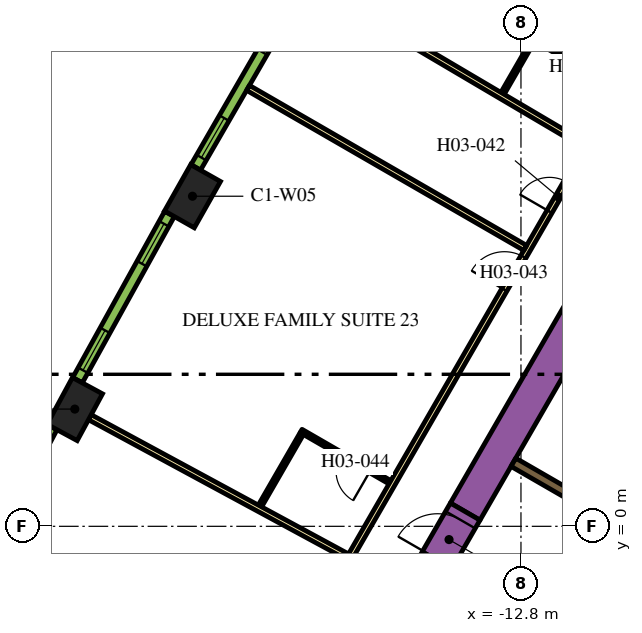
"""IFC4 building model, lengths in metres.
Left out: names, types, materials, properties, quantities, classifications, styles, units other than length and angle.
Written with IfcOpenShell. Run it as: python <this file> out.ifc"""

import sys

from ifc_helpers import new_model, si_unit, direction, frame, frame_2d, origin, origin_2d, place, context, subcontext, project, spatial, rectangle, extrude, element, fill, save


model = new_model("IFC4")
c1 = context("Model", 3, precision=1e-05, world=origin(), true_north=direction((0.0, 1.0)))
c2 = subcontext(c1, "Body", "Model", "MODEL_VIEW")
j1 = project(units=[si_unit("LENGTHUNIT", "METRE"), si_unit("PLANEANGLEUNIT", "RADIAN")], contexts=[c1])
p1 = place(None, origin())
s1 = spatial("IfcSite", under=j1, at=p1, CompositionType="ELEMENT")
p2 = place(p1, origin())
s2 = spatial("IfcBuilding", under=s1, at=p2, CompositionType="ELEMENT")
p3 = place(p2, frame((0.0, 0.0, 54.9)))
s3 = spatial("IfcBuildingStorey", under=s2, at=p3, CompositionType="ELEMENT", Elevation=54.9)
for number, where, z_axis, x_axis in (
    (1, (-21.443, 8.685, 0.0), (0.0, 0.0, 1.0), (-0.492, -0.871, 0.0)),
    (2, (-24.54, 3.085, 0.0), (0.0, 0.0, 1.0), (-0.476, -0.88, 0.0)),
):
    element("IfcColumn", number, at=place(p3, frame(where, z_axis=z_axis, x_axis=x_axis)), inside=s3, PredefinedType="COLUMN", context=c2, shape_type="SweptSolid", body=[
        extrude(rectangle(XDim=1.4, YDim=0.9, at=origin_2d()), origin(), (0.0, 0.0, 1.0), 3.9),
    ])
p4 = place(p3, frame((-14.268, 0.387, 0.0), z_axis=(0.0, 0.0, 1.0), x_axis=(0.499994617707, 0.866028511231, 0.0)))
e3 = element("IfcWall", 3, at=p4, inside=s3, PredefinedType="SOLIDWALL", context=c2, shape_type="SweptSolid", body=[
    extrude(rectangle(XDim=18.817, YDim=0.9, at=frame_2d((9.409, 0.0))), origin(), (0.0, 0.0, 1.0), 3.9),
])
p5 = place(p3, frame((-12.999, 1.685, 0.0), z_axis=(0.0, 0.0, 1.0), x_axis=(0.865996765544, -0.500049599607, 0.0)))
e4 = element("IfcWall", 4, at=p5, inside=s3, PredefinedType="SOLIDWALL", context=c2, shape_type="SweptSolid", body=[
    extrude(rectangle(XDim=2.498, YDim=0.25, at=frame_2d((1.249, 0.0))), origin(), (0.0, 0.0, 1.0), 3.9),
])
p6 = place(p3, frame((-15.118, -1.085, 0.0), z_axis=(0.0, 0.0, 1.0), x_axis=(0.500000056704, 0.866025371046, 0.0)))
e5 = element("IfcWall", 5, at=p6, inside=s3, PredefinedType="SOLIDWALL", context=c2, shape_type="SweptSolid", body=[
    extrude(rectangle(XDim=1.7, YDim=0.9, at=frame_2d((0.85, 0.0))), origin(), (0.0, 0.0, 1.0), 3.9),
])
p7 = place(p6, frame((0.25, 0.0, 0.0)))
e6 = element("IfcOpeningElement", 6, at=p7, cuts=e5, PredefinedType="OPENING", context=c2, shape_type="SweptSolid", body=[
    extrude(rectangle(XDim=1.2, YDim=2.1, at=frame_2d((0.6, 1.05))), frame((0.0, 0.46, 0.0), z_axis=(0.0, -1.0, 0.0), x_axis=(1.0, 0.0, 0.0)), (0.0, 0.0, 1.0), 0.92),
])
p8 = place(p3, frame((-19.081, -3.9, 0.0), z_axis=(0.0, 0.0, 1.0), x_axis=(0.499998313975, 0.866026377209, 0.0)))
e7 = element("IfcWall", 7, at=p8, inside=s3, PredefinedType="PARTITIONING", context=c2, shape_type="SweptSolid", body=[
    extrude(rectangle(XDim=25.766, YDim=0.15, at=frame_2d((12.883, 0.0))), origin(), (0.0, 0.0, 1.0), 2.75),
])
p9 = place(p8, frame((22.445, 0.0, 0.0)))
e8 = element("IfcOpeningElement", 8, at=p9, cuts=e7, PredefinedType="OPENING", context=c2, shape_type="SweptSolid", body=[
    extrude(rectangle(XDim=1.0, YDim=2.1, at=frame_2d((0.5, 1.05))), frame((0.0, 0.085, 0.0), z_axis=(0.0, -1.0, 0.0), x_axis=(1.0, 0.0, 0.0)), (0.0, 0.0, 1.0), 0.17),
])
p10 = place(p8, frame((21.138, 0.0, 0.0)))
e9 = element("IfcOpeningElement", 9, at=p10, cuts=e7, PredefinedType="OPENING", context=c2, shape_type="SweptSolid", body=[
    extrude(rectangle(XDim=1.0, YDim=2.1, at=frame_2d((0.5, 1.05))), frame((0.0, 0.085, 0.0), z_axis=(0.0, -1.0, 0.0), x_axis=(1.0, 0.0, 0.0)), (0.0, 0.0, 1.0), 0.17),
])
p11 = place(p8, frame((14.066, 0.0, 0.0)))
e10 = element("IfcOpeningElement", 10, at=p11, cuts=e7, PredefinedType="OPENING", context=c2, shape_type="SweptSolid", body=[
    extrude(rectangle(XDim=0.9, YDim=2.1, at=frame_2d((0.45, 1.05))), frame((0.0, 0.085, 0.0), z_axis=(0.0, -1.0, 0.0), x_axis=(1.0, 0.0, 0.0)), (0.0, 0.0, 1.0), 0.17),
])
p12 = place(p8, frame((11.693, 0.0, 0.0)))
e11 = element("IfcOpeningElement", 11, at=p12, cuts=e7, PredefinedType="OPENING", context=c2, shape_type="SweptSolid", body=[
    extrude(rectangle(XDim=1.0, YDim=2.1, at=frame_2d((0.5, 1.05))), frame((0.0, 0.085, 0.0), z_axis=(0.0, -1.0, 0.0), x_axis=(1.0, 0.0, 0.0)), (0.0, 0.0, 1.0), 0.17),
])
p13 = place(p3, frame((-24.145, 2.871, 0.0), z_axis=(0.0, 0.0, 1.0), x_axis=(0.879551725039, -0.475803281809, 0.0)))
e12 = element("IfcWall", 12, at=p13, inside=s3, PredefinedType="PARTITIONING", context=c2, shape_type="SweptSolid", body=[
    extrude(rectangle(XDim=7.688, YDim=0.15, at=frame_2d((3.844, 0.0))), origin(), (0.0, 0.0, 1.0), 2.75),
])
p14 = place(p3, frame((-19.982, 11.537, 0.0), z_axis=(0.0, 0.0, 1.0), x_axis=(0.866020994654, -0.500007636761, 0.0)))
e13 = element("IfcWall", 13, at=p14, inside=s3, PredefinedType="PARTITIONING", context=c2, shape_type="SweptSolid", body=[
    extrude(rectangle(XDim=8.423, YDim=0.15, at=frame_2d((4.211, 0.0))), origin(), (0.0, 0.0, 1.0), 2.75),
])
p15 = place(p3, frame((-17.856, 13.999, 0.0), z_axis=(0.0, 0.0, 1.0), x_axis=(0.861371519381, -0.507975497047, 0.0)))
e14 = element("IfcWall", 14, at=p15, inside=s3, PredefinedType="PARTITIONING", context=c2, shape_type="SweptSolid", body=[
    extrude(rectangle(XDim=7.804, YDim=0.15, at=frame_2d((3.902, 0.0))), origin(), (0.0, 0.0, 1.0), 2.75),
])
p16 = place(p3, frame((-10.249, 11.549, 0.0), z_axis=(0.0, 0.0, 1.0), x_axis=(-0.866021400173, 0.500006934395, 0.0)))
e15 = element("IfcWall", 15, at=p16, inside=s3, PredefinedType="PARTITIONING", context=c2, shape_type="SweptSolid", body=[
    extrude(rectangle(XDim=2.6, YDim=0.1, at=frame_2d((1.3, 0.0))), origin(), (0.0, 0.0, 1.0), 2.75),
])
p17 = place(p16, frame((0.6, 0.0, 0.0)))
e16 = element("IfcOpeningElement", 16, at=p17, cuts=e15, PredefinedType="OPENING", context=c2, shape_type="SweptSolid", body=[
    extrude(rectangle(XDim=0.9, YDim=2.1, at=frame_2d((0.45, 1.05))), frame((0.0, 0.06, 0.0), z_axis=(0.0, -1.0, 0.0), x_axis=(1.0, 0.0, 0.0)), (0.0, 0.0, 1.0), 0.12),
])
p18 = place(p3, frame((-12.487, 12.772, 0.0), z_axis=(0.0, 0.0, 1.0), x_axis=(-0.500085729368, -0.865975902253, 0.0)))
e17 = element("IfcWall", 17, at=p18, inside=s3, PredefinedType="PARTITIONING", context=c2, shape_type="SweptSolid", body=[
    extrude(rectangle(XDim=1.59, YDim=0.1, at=frame_2d((0.795, 0.0))), origin(), (0.0, 0.0, 1.0), 2.75),
])
p19 = place(p3, frame((-16.247, 1.159, 0.0), z_axis=(0.0, 0.0, 1.0), x_axis=(-0.866059108428, 0.4999416173, 0.0)))
e18 = element("IfcWall", 18, at=p19, inside=s3, PredefinedType="PARTITIONING", context=c2, shape_type="SweptSolid", body=[
    extrude(rectangle(XDim=2.7, YDim=0.1, at=frame_2d((1.35, 0.0))), origin(), (0.0, 0.0, 1.0), 2.75),
])
p20 = place(p19, frame((0.6, 0.0, 0.0)))
e19 = element("IfcOpeningElement", 19, at=p20, cuts=e18, PredefinedType="OPENING", context=c2, shape_type="SweptSolid", body=[
    extrude(rectangle(XDim=0.9, YDim=2.1, at=frame_2d((0.45, 1.05))), frame((0.0, 0.06, 0.0), z_axis=(0.0, -1.0, 0.0), x_axis=(1.0, 0.0, 0.0)), (0.0, 0.0, 1.0), 0.12),
])
p21 = place(p3, frame((-18.567, 2.441, 0.0), z_axis=(0.0, 0.0, 1.0), x_axis=(-0.499946605688, -0.86605622881, 0.0)))
e20 = element("IfcWall", 20, at=p21, inside=s3, PredefinedType="PARTITIONING", context=c2, shape_type="SweptSolid", body=[
    extrude(rectangle(XDim=2.2, YDim=0.1, at=frame_2d((1.1, 0.0))), origin(), (0.0, 0.0, 1.0), 2.75),
])
p22 = place(p3, frame((-18.858, 13.773, 0.0), z_axis=(0.0, 0.0, 1.0), x_axis=(-0.50002123722, -0.866013142123, 0.0)))
e21 = element("IfcWall", 21, at=p22, inside=s3, PredefinedType="SOLIDWALL", context=c2, shape_type="SweptSolid", body=[
    extrude(rectangle(XDim=4.998, YDim=0.29, at=frame_2d((2.499, 0.0))), origin(), (0.0, 0.0, 1.0), 3.65),
])
p23 = place(p22, frame((0.297, 0.0, 0.9)))
e22 = element("IfcOpeningElement", 22, at=p23, cuts=e21, PredefinedType="OPENING", context=c2, shape_type="SweptSolid", body=[
    extrude(rectangle(XDim=1.2, YDim=2.15, at=frame_2d((0.6, 1.075))), frame((0.0, 0.155, 0.0), z_axis=(0.0, -1.0, 0.0), x_axis=(1.0, 0.0, 0.0)), (0.0, 0.0, 1.0), 0.31),
])
p24 = place(p22, frame((3.501, 0.0, 0.9)))
e23 = element("IfcOpeningElement", 23, at=p24, cuts=e21, PredefinedType="OPENING", context=c2, shape_type="SweptSolid", body=[
    extrude(rectangle(XDim=1.2, YDim=2.15, at=frame_2d((0.6, 1.075))), frame((0.0, 0.155, 0.0), z_axis=(0.0, -1.0, 0.0), x_axis=(1.0, 0.0, 0.0)), (0.0, 0.0, 1.0), 0.31),
])
p25 = place(p3, frame((-22.05, 8.22, 0.0), z_axis=(0.0, 0.0, 1.0), x_axis=(-0.483912572871, -0.875116347589, 0.0)))
e24 = element("IfcWall", 24, at=p25, inside=s3, PredefinedType="SOLIDWALL", context=c2, shape_type="SweptSolid", body=[
    extrude(rectangle(XDim=4.998, YDim=0.29, at=frame_2d((2.499, 0.0))), origin(), (0.0, 0.0, 1.0), 3.65),
])
p26 = place(p25, frame((0.297, 0.0, 0.9)))
e25 = element("IfcOpeningElement", 25, at=p26, cuts=e24, PredefinedType="OPENING", context=c2, shape_type="SweptSolid", body=[
    extrude(rectangle(XDim=1.2, YDim=2.15, at=frame_2d((0.6, 1.075))), frame((0.0, 0.155, 0.0), z_axis=(0.0, -1.0, 0.0), x_axis=(1.0, 0.0, 0.0)), (0.0, 0.0, 1.0), 0.31),
])
p27 = place(p25, frame((3.501, 0.0, 0.9)))
e26 = element("IfcOpeningElement", 26, at=p27, cuts=e24, PredefinedType="OPENING", context=c2, shape_type="SweptSolid", body=[
    extrude(rectangle(XDim=1.2, YDim=2.15, at=frame_2d((0.6, 1.075))), frame((0.0, 0.155, 0.0), z_axis=(0.0, -1.0, 0.0), x_axis=(1.0, 0.0, 0.0)), (0.0, 0.0, 1.0), 0.31),
])
p28 = place(p3, frame((-25.138, 2.608, 0.0), z_axis=(0.0, 0.0, 1.0), x_axis=(-0.467629620899, -0.883924509026, 0.0)))
e27 = element("IfcWall", 27, at=p28, inside=s3, PredefinedType="SOLIDWALL", context=c2, shape_type="SweptSolid", body=[
    extrude(rectangle(XDim=4.998, YDim=0.29, at=frame_2d((2.499, 0.0))), origin(), (0.0, 0.0, 1.0), 3.65),
])
p29 = place(p28, frame((0.297, 0.0, 0.9)))
e28 = element("IfcOpeningElement", 28, at=p29, cuts=e27, PredefinedType="OPENING", context=c2, shape_type="SweptSolid", body=[
    extrude(rectangle(XDim=1.2, YDim=2.15, at=frame_2d((0.6, 1.075))), frame((0.0, 0.155, 0.0), z_axis=(0.0, -1.0, 0.0), x_axis=(1.0, 0.0, 0.0)), (0.0, 0.0, 1.0), 0.31),
])
p30 = place(p28, frame((3.501, 0.0, 0.9)))
e29 = element("IfcOpeningElement", 29, at=p30, cuts=e27, PredefinedType="OPENING", context=c2, shape_type="SweptSolid", body=[
    extrude(rectangle(XDim=1.2, YDim=2.15, at=frame_2d((0.6, 1.075))), frame((0.0, 0.155, 0.0), z_axis=(0.0, -1.0, 0.0), x_axis=(1.0, 0.0, 0.0)), (0.0, 0.0, 1.0), 0.31),
])
p31 = place(p7, origin())
e30 = element("IfcDoor", 30, at=p31, inside=s3, OperationType="SINGLE_SWING_LEFT", PredefinedType="DOOR", context=c2, shape_type="SweptSolid", body=[
    extrude(rectangle(XDim=1.2, YDim=2.1, at=frame_2d((0.6, 1.05))), frame((0.0, 0.025, 0.0), z_axis=(0.0, -1.0, 0.0), x_axis=(1.0, 0.0, 0.0)), (0.0, 0.0, 1.0), 0.05),
])
fill(e6, e30)
p32 = place(p11, origin())
e31 = element("IfcDoor", 31, at=p32, inside=s3, OperationType="SINGLE_SWING_RIGHT", PredefinedType="DOOR", context=c2, shape_type="SweptSolid", body=[
    extrude(rectangle(XDim=0.9, YDim=2.1, at=frame_2d((0.45, 1.05))), frame((0.0, 0.025, 0.0), z_axis=(0.0, -1.0, 0.0), x_axis=(1.0, 0.0, 0.0)), (0.0, 0.0, 1.0), 0.05),
])
fill(e10, e31)
p33 = place(p12, origin())
e32 = element("IfcDoor", 32, at=p33, inside=s3, OperationType="SINGLE_SWING_RIGHT", PredefinedType="DOOR", context=c2, shape_type="SweptSolid", body=[
    extrude(rectangle(XDim=1.0, YDim=2.1, at=frame_2d((0.5, 1.05))), frame((0.0, 0.025, 0.0), z_axis=(0.0, -1.0, 0.0), x_axis=(1.0, 0.0, 0.0)), (0.0, 0.0, 1.0), 0.05),
])
fill(e11, e32)
p34 = place(p20, origin())
e33 = element("IfcDoor", 33, at=p34, inside=s3, OperationType="SINGLE_SWING_LEFT", PredefinedType="DOOR", context=c2, shape_type="SweptSolid", body=[
    extrude(rectangle(XDim=0.9, YDim=2.1, at=frame_2d((0.45, 1.05))), frame((0.0, 0.025, 0.0), z_axis=(0.0, -1.0, 0.0), x_axis=(1.0, 0.0, 0.0)), (0.0, 0.0, 1.0), 0.05),
])
fill(e19, e33)
p35 = place(p24, origin())
e34 = element("IfcWindow", 34, at=p35, inside=s3, PartitioningType="DOUBLE_PANEL_VERTICAL", PredefinedType="WINDOW", context=c2, shape_type="SweptSolid", body=[
    extrude(rectangle(XDim=1.2, YDim=2.15, at=frame_2d((0.6, 1.075))), frame((0.0, 0.015, 0.0), z_axis=(0.0, -1.0, 0.0), x_axis=(1.0, 0.0, 0.0)), (0.0, 0.0, 1.0), 0.06),
])
fill(e23, e34)
p36 = place(p26, origin())
e35 = element("IfcWindow", 35, at=p36, inside=s3, PartitioningType="DOUBLE_PANEL_VERTICAL", PredefinedType="WINDOW", context=c2, shape_type="SweptSolid", body=[
    extrude(rectangle(XDim=1.2, YDim=2.15, at=frame_2d((0.6, 1.075))), frame((0.0, 0.015, 0.0), z_axis=(0.0, -1.0, 0.0), x_axis=(1.0, 0.0, 0.0)), (0.0, 0.0, 1.0), 0.06),
])
fill(e25, e35)
p37 = place(p27, origin())
e36 = element("IfcWindow", 36, at=p37, inside=s3, PartitioningType="DOUBLE_PANEL_VERTICAL", PredefinedType="WINDOW", context=c2, shape_type="SweptSolid", body=[
    extrude(rectangle(XDim=1.2, YDim=2.15, at=frame_2d((0.6, 1.075))), frame((0.0, 0.015, 0.0), z_axis=(0.0, -1.0, 0.0), x_axis=(1.0, 0.0, 0.0)), (0.0, 0.0, 1.0), 0.06),
])
fill(e26, e36)
save(model, sys.argv[1])
